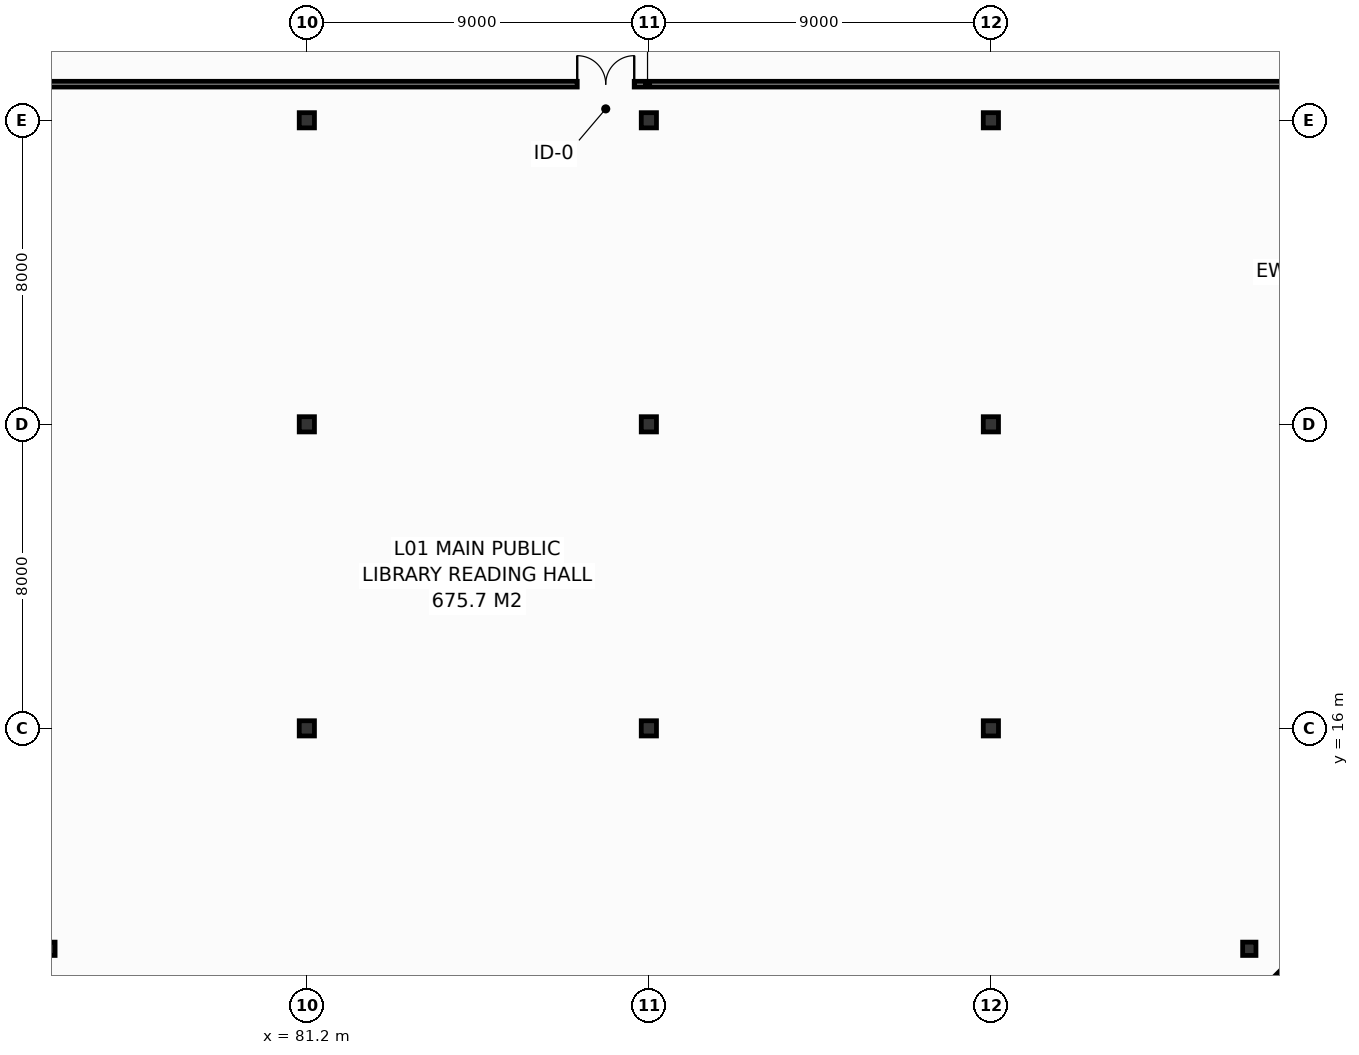
"""IFC4 building model, lengths in metres.
Left out: names, types, materials, properties, quantities, classifications, styles, units other than length and angle.
Written with IfcOpenShell. Run it as: python <this file> out.ifc"""

import sys

from ifc_helpers import new_model, si_unit, direction, frame, frame_2d, origin, origin_2d, place, context, subcontext, project, spatial, rectangle, i_section, extrude, element, fill, save


model = new_model("IFC4")
c1 = context("Model", 3, precision=1e-05, world=origin(), true_north=direction((0.0, 1.0)))
c2 = subcontext(c1, "Body", "Model", "MODEL_VIEW")
j1 = project(units=[si_unit("LENGTHUNIT", "METRE"), si_unit("PLANEANGLEUNIT", "RADIAN")], contexts=[c1])
p1 = place(None, origin())
s1 = spatial("IfcSite", under=j1, at=p1, CompositionType="ELEMENT")
p2 = place(p1, origin())
s2 = spatial("IfcBuilding", under=s1, at=p2, CompositionType="ELEMENT")
p3 = place(p2, frame((0.0, 0.0, 6.0)))
s3 = spatial("IfcBuildingStorey", under=s2, at=p3, CompositionType="ELEMENT", Elevation=6.0)
p4 = place(p3, frame((74.4, 10.2, 0.0), z_axis=(0.0, 0.0, 1.0), x_axis=(1.0, 0.0, 0.0)))
e1 = element("IfcColumn", 1, at=p4, inside=s3, PredefinedType="COLUMN", context=c2, shape_type="SweptSolid", body=[
    extrude(i_section(OverallWidth=0.35, OverallDepth=0.35, WebThickness=0.012, FlangeThickness=0.019, FilletRadius=0.02, at=origin_2d()), origin(), (0.0, 0.0, 1.0), 5.4),
])
for number, where, z_axis, x_axis in (
    (2, (81.2, 16.0, 0.0), (0.0, 0.0, 1.0), (1.0, 0.0, 0.0)),
    (3, (81.2, 24.0, 0.0), (0.0, 0.0, 1.0), (1.0, 0.0, 0.0)),
    (4, (81.2, 32.0, 0.0), (0.0, 0.0, 1.0), (1.0, 0.0, 0.0)),
    (5, (90.2, 16.0, 0.0), (0.0, 0.0, 1.0), (1.0, 0.0, 0.0)),
    (6, (90.2, 24.0, 0.0), (0.0, 0.0, 1.0), (1.0, 0.0, 0.0)),
    (7, (90.2, 32.0, 0.0), (0.0, 0.0, 1.0), (1.0, 0.0, 0.0)),
    (8, (99.2, 16.0, 0.0), (0.0, 0.0, 1.0), (1.0, 0.0, 0.0)),
    (9, (99.2, 24.0, 0.0), (0.0, 0.0, 1.0), (1.0, 0.0, 0.0)),
    (10, (99.2, 32.0, 0.0), (0.0, 0.0, 1.0), (1.0, 0.0, 0.0)),
):
    element("IfcColumn", number, at=place(p3, frame(where, z_axis=z_axis, x_axis=x_axis)), inside=s3, PredefinedType="COLUMN", context=c2, shape_type="SweptSolid", body=[
        extrude(i_section(OverallWidth=0.4, OverallDepth=0.4, WebThickness=0.013, FlangeThickness=0.021, FilletRadius=0.022, at=origin_2d()), origin(), (0.0, 0.0, 1.0), 5.4),
    ])
p5 = place(p3, frame((106.0, 10.2, 0.0), z_axis=(0.0, 0.0, 1.0), x_axis=(1.0, 0.0, 0.0)))
e11 = element("IfcColumn", 11, at=p5, inside=s3, PredefinedType="COLUMN", context=c2, shape_type="SweptSolid", body=[
    extrude(i_section(OverallWidth=0.35, OverallDepth=0.35, WebThickness=0.012, FlangeThickness=0.019, FilletRadius=0.02, at=origin_2d()), origin(), (0.0, 0.0, 1.0), 5.4),
])
p6 = place(p3, frame((72.313, 10.687, 0.0), z_axis=(0.0, 0.0, 1.0), x_axis=(0.707106781187, -0.707106781187, 0.0)))
e12 = element("IfcWall", 12, at=p6, inside=s3, PredefinedType="STANDARD", context=c2, shape_type="SweptSolid", body=[
    extrude(rectangle(XDim=3.64, YDim=0.3, at=frame_2d((1.82, 0.0))), origin(), (0.0, 0.0, 1.0), 5.1),
])
p7 = place(p3, frame((105.513, 8.113, 0.0), z_axis=(0.0, 0.0, 1.0), x_axis=(0.707073244381, 0.707140316402, 0.0)))
e13 = element("IfcWall", 13, at=p7, inside=s3, PredefinedType="STANDARD", context=c2, shape_type="SweptSolid", body=[
    extrude(rectangle(XDim=3.64, YDim=0.3, at=frame_2d((1.82, 0.0))), origin(), (0.0, 0.0, 1.0), 5.1),
])
p8 = place(p3, frame((72.3, 32.95, 0.0), z_axis=(0.0, 0.0, 1.0), x_axis=(1.0, 0.0, 0.0)))
e14 = element("IfcWall", 14, at=p8, inside=s3, PredefinedType="PARTITIONING", context=c2, shape_type="SweptSolid", body=[
    extrude(rectangle(XDim=35.73, YDim=0.15, at=frame_2d((17.865, 0.0))), origin(), (0.0, 0.0, 1.0), 4.385),
])
p9 = place(p8, frame((16.015, 0.0, 0.0)))
e15 = element("IfcOpeningElement", 15, at=p9, cuts=e14, PredefinedType="OPENING", context=c2, shape_type="SweptSolid", body=[
    extrude(rectangle(XDim=1.5, YDim=2.2, at=frame_2d((0.75, 1.1))), frame((0.0, 0.085, 0.0), z_axis=(0.0, -1.0, 0.0), x_axis=(1.0, 0.0, 0.0)), (0.0, 0.0, 1.0), 0.17),
])
p10 = place(p9, origin())
e16 = element("IfcDoor", 16, at=p10, inside=s3, OperationType="DOUBLE_DOOR_SINGLE_SWING", PredefinedType="DOOR", context=c2, shape_type="SweptSolid", body=[
    extrude(rectangle(XDim=1.5, YDim=2.2, at=frame_2d((0.75, 1.1))), frame((0.0, 0.025, 0.0), z_axis=(0.0, -1.0, 0.0), x_axis=(1.0, 0.0, 0.0)), (0.0, 0.0, 1.0), 0.05),
])
fill(e15, e16)
save(model, sys.argv[1])
